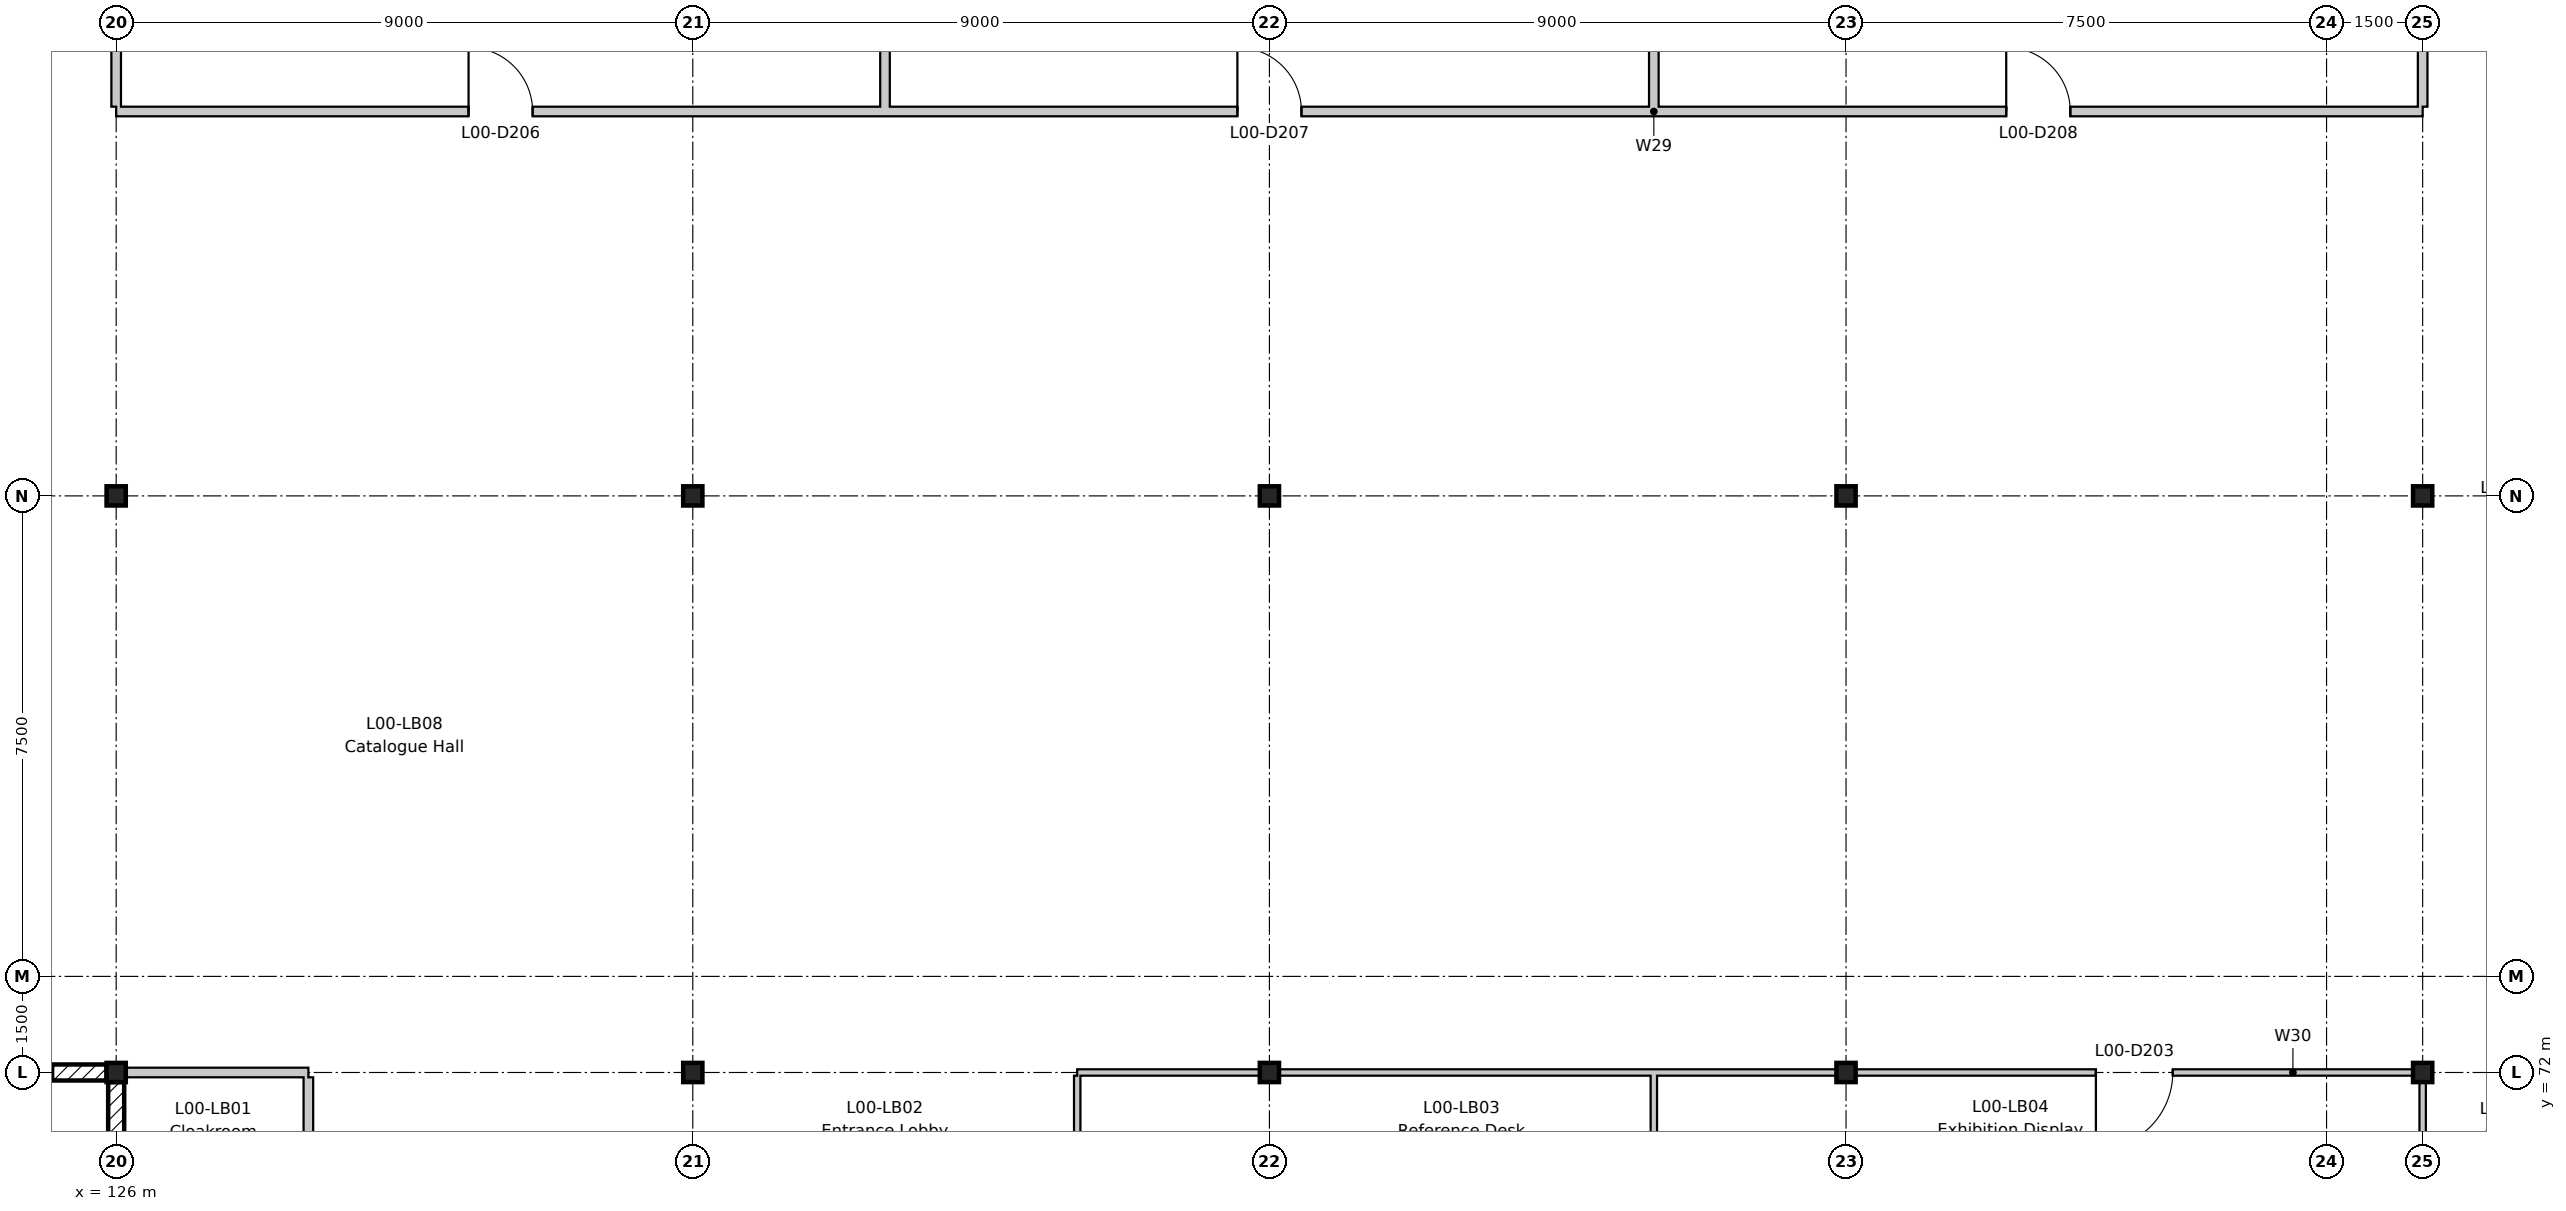
"""IFC4 building model, lengths in metres.
Left out: names, types, materials, properties, quantities, classifications, styles, units other than length and angle.
Written with IfcOpenShell. Run it as: python <this file> out.ifc"""

import sys

from ifc_helpers import new_model, si_unit, direction, frame, frame_2d, origin, origin_2d, place, context, subcontext, project, spatial, rectangle, i_section, extrude, element, fill, save


model = new_model("IFC4")
c1 = context("Model", 3, precision=1e-05, world=origin(), true_north=direction((0.0, 1.0)))
c2 = subcontext(c1, "Body", "Model", "MODEL_VIEW")
j1 = project(units=[si_unit("LENGTHUNIT", "METRE"), si_unit("PLANEANGLEUNIT", "RADIAN")], contexts=[c1])
p1 = place(None, origin())
s1 = spatial("IfcSite", under=j1, at=p1, CompositionType="ELEMENT")
p2 = place(p1, origin())
s2 = spatial("IfcBuilding", under=s1, at=p2, CompositionType="ELEMENT")
p3 = place(p2, origin())
s3 = spatial("IfcBuildingStorey", under=s2, at=p3, CompositionType="ELEMENT", Elevation=0.0)
for number, where, z_axis, x_axis in (
    (1, (126.0, 72.0, -0.6), (0.0, 0.0, 1.0), (1.0, 0.0, 0.0)),
    (2, (126.0, 81.0, -0.6), (0.0, 0.0, 1.0), (1.0, 0.0, 0.0)),
    (3, (135.0, 72.0, -0.6), (0.0, 0.0, 1.0), (1.0, 0.0, 0.0)),
    (4, (135.0, 81.0, -0.6), (0.0, 0.0, 1.0), (1.0, 0.0, 0.0)),
    (5, (144.0, 72.0, -0.6), (0.0, 0.0, 1.0), (1.0, 0.0, 0.0)),
    (6, (144.0, 81.0, -0.6), (0.0, 0.0, 1.0), (1.0, 0.0, 0.0)),
    (7, (153.0, 72.0, -0.6), (0.0, 0.0, 1.0), (1.0, 0.0, 0.0)),
    (8, (153.0, 81.0, -0.6), (0.0, 0.0, 1.0), (1.0, 0.0, 0.0)),
    (9, (162.0, 72.0, -0.6), (0.0, 0.0, 1.0), (1.0, 0.0, 0.0)),
    (10, (162.0, 81.0, -0.6), (0.0, 0.0, 1.0), (1.0, 0.0, 0.0)),
):
    element("IfcColumn", number, at=place(p3, frame(where, z_axis=z_axis, x_axis=x_axis)), inside=s3, PredefinedType="COLUMN", context=c2, shape_type="SweptSolid", body=[
        extrude(i_section(OverallWidth=0.3, OverallDepth=0.3, WebThickness=0.011, FlangeThickness=0.019, FilletRadius=0.027, at=origin_2d()), origin(), (0.0, 0.0, 1.0), 5.8),
    ])
p4 = place(p3, frame((126.0, 63.2, 0.0), z_axis=(0.0, 0.0, 1.0), x_axis=(0.0, 1.0, 0.0)))
e11 = element("IfcWall", 11, at=p4, inside=s3, PredefinedType="SHEAR", context=c2, shape_type="SweptSolid", body=[
    extrude(rectangle(XDim=8.65, YDim=0.25, at=frame_2d((4.325, 0.0))), origin(), (0.0, 0.0, 1.0), 5.2),
])
p5 = place(p3, frame((117.2, 72.0, 0.0), z_axis=(0.0, 0.0, 1.0), x_axis=(1.0, 0.0, 0.0)))
e12 = element("IfcWall", 12, at=p5, inside=s3, PredefinedType="SHEAR", context=c2, shape_type="SweptSolid", body=[
    extrude(rectangle(XDim=8.65, YDim=0.25, at=frame_2d((4.325, 0.0))), origin(), (0.0, 0.0, 1.0), 5.2),
])
p6 = place(p5, frame((6.6, 0.0, 0.0)))
e13 = element("IfcOpeningElement", 13, at=p6, cuts=e12, PredefinedType="OPENING", context=c2, shape_type="SweptSolid", body=[
    extrude(rectangle(XDim=1.2, YDim=2.1, at=frame_2d((0.6, 1.05))), frame((0.0, 0.135, 0.0), z_axis=(0.0, -1.0, 0.0), x_axis=(1.0, 0.0, 0.0)), (0.0, 0.0, 1.0), 0.27),
])
p7 = place(p3, frame((126.15, 72.0, 0.0), z_axis=(0.0, 0.0, 1.0), x_axis=(1.0, 0.0, 0.0)))
e14 = element("IfcWall", 14, at=p7, inside=s3, PredefinedType="PARTITIONING", context=c2, shape_type="SweptSolid", body=[
    extrude(rectangle(XDim=2.85, YDim=0.15, at=frame_2d((1.425, 0.0))), origin(), (0.0, 0.0, 1.0), 4.68),
])
p8 = place(p3, frame((141.0, 72.0, 0.0), z_axis=(0.0, 0.0, 1.0), x_axis=(1.0, 0.0, 0.0)))
e15 = element("IfcWall", 15, at=p8, inside=s3, PredefinedType="PARTITIONING", context=c2, shape_type="SweptSolid", body=[
    extrude(rectangle(XDim=2.85, YDim=0.1, at=frame_2d((1.425, 0.0))), origin(), (0.0, 0.0, 1.0), 4.68),
])
p9 = place(p3, frame((144.15, 72.0, 0.0), z_axis=(0.0, 0.0, 1.0), x_axis=(1.0, 0.0, 0.0)))
e16 = element("IfcWall", 16, at=p9, inside=s3, PredefinedType="PARTITIONING", context=c2, shape_type="SweptSolid", body=[
    extrude(rectangle(XDim=8.7, YDim=0.1, at=frame_2d((4.35, 0.0))), origin(), (0.0, 0.0, 1.0), 4.68),
])
p10 = place(p3, frame((153.15, 72.0, 0.0), z_axis=(0.0, 0.0, 1.0), x_axis=(1.0, 0.0, 0.0)))
e17 = element("IfcWall", 17, at=p10, inside=s3, PredefinedType="PARTITIONING", context=c2, shape_type="SweptSolid", body=[
    extrude(rectangle(XDim=8.7, YDim=0.1, at=frame_2d((4.35, 0.0))), origin(), (0.0, 0.0, 1.0), 4.68),
])
p11 = place(p10, frame((3.75, 0.0, 0.0)))
e18 = element("IfcOpeningElement", 18, at=p11, cuts=e17, PredefinedType="OPENING", context=c2, shape_type="SweptSolid", body=[
    extrude(rectangle(XDim=1.2, YDim=2.1, at=frame_2d((0.6, 1.05))), frame((0.0, 0.06, 0.0), z_axis=(0.0, -1.0, 0.0), x_axis=(1.0, 0.0, 0.0)), (0.0, 0.0, 1.0), 0.12),
])
p12 = place(p3, frame((126.0, 87.0, 0.0), z_axis=(0.0, 0.0, 1.0), x_axis=(1.0, 0.0, 0.0)))
e19 = element("IfcWall", 19, at=p12, inside=s3, PredefinedType="PARTITIONING", context=c2, shape_type="SweptSolid", body=[
    extrude(rectangle(XDim=36.0, YDim=0.15, at=frame_2d((18.0, 0.0))), origin(), (0.0, 0.0, 1.0), 4.68),
])
p13 = place(p12, frame((5.5, 0.0, 0.0)))
e20 = element("IfcOpeningElement", 20, at=p13, cuts=e19, PredefinedType="OPENING", context=c2, shape_type="SweptSolid", body=[
    extrude(rectangle(XDim=1.0, YDim=2.1, at=frame_2d((0.5, 1.05))), frame((0.0, 0.085, 0.0), z_axis=(0.0, -1.0, 0.0), x_axis=(1.0, 0.0, 0.0)), (0.0, 0.0, 1.0), 0.17),
])
p14 = place(p12, frame((17.5, 0.0, 0.0)))
e21 = element("IfcOpeningElement", 21, at=p14, cuts=e19, PredefinedType="OPENING", context=c2, shape_type="SweptSolid", body=[
    extrude(rectangle(XDim=1.0, YDim=2.1, at=frame_2d((0.5, 1.05))), frame((0.0, 0.085, 0.0), z_axis=(0.0, -1.0, 0.0), x_axis=(1.0, 0.0, 0.0)), (0.0, 0.0, 1.0), 0.17),
])
p15 = place(p12, frame((29.5, 0.0, 0.0)))
e22 = element("IfcOpeningElement", 22, at=p15, cuts=e19, PredefinedType="OPENING", context=c2, shape_type="SweptSolid", body=[
    extrude(rectangle(XDim=1.0, YDim=2.1, at=frame_2d((0.5, 1.05))), frame((0.0, 0.085, 0.0), z_axis=(0.0, -1.0, 0.0), x_axis=(1.0, 0.0, 0.0)), (0.0, 0.0, 1.0), 0.17),
])
p16 = place(p3, frame((126.0, 87.075, 0.0), z_axis=(0.0, 0.0, 1.0), x_axis=(0.0, 1.0, 0.0)))
e23 = element("IfcWall", 23, at=p16, inside=s3, PredefinedType="PARTITIONING", context=c2, shape_type="SweptSolid", body=[
    extrude(rectangle(XDim=2.775, YDim=0.15, at=frame_2d((1.388, 0.0))), origin(), (0.0, 0.0, 1.0), 4.68),
])
p17 = place(p3, frame((129.0, 63.2, 0.0), z_axis=(0.0, 0.0, 1.0), x_axis=(0.0, 1.0, 0.0)))
e24 = element("IfcWall", 24, at=p17, inside=s3, PredefinedType="PARTITIONING", context=c2, shape_type="SweptSolid", body=[
    extrude(rectangle(XDim=8.725, YDim=0.15, at=frame_2d((4.363, 0.0))), origin(), (0.0, 0.0, 1.0), 4.68),
])
p18 = place(p17, frame((3.8, 0.0, 0.0)))
e25 = element("IfcOpeningElement", 25, at=p18, cuts=e24, PredefinedType="OPENING", context=c2, shape_type="SweptSolid", body=[
    extrude(rectangle(XDim=1.0, YDim=2.1, at=frame_2d((0.5, 1.05))), frame((0.0, 0.085, 0.0), z_axis=(0.0, -1.0, 0.0), x_axis=(1.0, 0.0, 0.0)), (0.0, 0.0, 1.0), 0.17),
])
p19 = place(p3, frame((138.0, 87.075, 0.0), z_axis=(0.0, 0.0, 1.0), x_axis=(0.0, 1.0, 0.0)))
e26 = element("IfcWall", 26, at=p19, inside=s3, PredefinedType="PARTITIONING", context=c2, shape_type="SweptSolid", body=[
    extrude(rectangle(XDim=2.85, YDim=0.15, at=frame_2d((1.425, 0.0))), origin(), (0.0, 0.0, 1.0), 4.68),
])
p20 = place(p3, frame((141.0, 63.2, 0.0), z_axis=(0.0, 0.0, 1.0), x_axis=(0.0, 1.0, 0.0)))
e27 = element("IfcWall", 27, at=p20, inside=s3, PredefinedType="PARTITIONING", context=c2, shape_type="SweptSolid", body=[
    extrude(rectangle(XDim=8.75, YDim=0.1, at=frame_2d((4.375, 0.0))), origin(), (0.0, 0.0, 1.0), 4.68),
])
p21 = place(p20, frame((3.7, 0.0, 0.0)))
e28 = element("IfcOpeningElement", 28, at=p21, cuts=e27, PredefinedType="OPENING", context=c2, shape_type="SweptSolid", body=[
    extrude(rectangle(XDim=1.2, YDim=2.1, at=frame_2d((0.6, 1.05))), frame((0.0, 0.06, 0.0), z_axis=(0.0, -1.0, 0.0), x_axis=(1.0, 0.0, 0.0)), (0.0, 0.0, 1.0), 0.12),
])
p22 = place(p3, frame((150.0, 87.075, 0.0), z_axis=(0.0, 0.0, 1.0), x_axis=(0.0, 1.0, 0.0)))
e29 = element("IfcWall", 29, at=p22, inside=s3, PredefinedType="PARTITIONING", context=c2, shape_type="SweptSolid", body=[
    extrude(rectangle(XDim=2.85, YDim=0.15, at=frame_2d((1.425, 0.0))), origin(), (0.0, 0.0, 1.0), 4.68),
])
p23 = place(p3, frame((150.0, 63.2, 0.0), z_axis=(0.0, 0.0, 1.0), x_axis=(0.0, 1.0, 0.0)))
e30 = element("IfcWall", 30, at=p23, inside=s3, PredefinedType="PARTITIONING", context=c2, shape_type="SweptSolid", body=[
    extrude(rectangle(XDim=8.75, YDim=0.1, at=frame_2d((4.375, 0.0))), origin(), (0.0, 0.0, 1.0), 4.68),
])
p24 = place(p3, frame((162.0, 87.075, 0.0), z_axis=(0.0, 0.0, 1.0), x_axis=(0.0, 1.0, 0.0)))
e31 = element("IfcWall", 31, at=p24, inside=s3, PredefinedType="PARTITIONING", context=c2, shape_type="SweptSolid", body=[
    extrude(rectangle(XDim=2.775, YDim=0.15, at=frame_2d((1.388, 0.0))), origin(), (0.0, 0.0, 1.0), 4.68),
])
p25 = place(p3, frame((162.0, 63.2, 0.0), z_axis=(0.0, 0.0, 1.0), x_axis=(0.0, 1.0, 0.0)))
e32 = element("IfcWall", 32, at=p25, inside=s3, PredefinedType="PARTITIONING", context=c2, shape_type="SweptSolid", body=[
    extrude(rectangle(XDim=8.65, YDim=0.1, at=frame_2d((4.325, 0.0))), origin(), (0.0, 0.0, 1.0), 4.68),
])
p26 = place(p11, frame((1.2, 0.0, 0.0), z_axis=(0.0, 0.0, 1.0), x_axis=(-1.0, 0.0, 0.0)))
e33 = element("IfcDoor", 33, at=p26, inside=s3, OperationType="SINGLE_SWING_RIGHT", PredefinedType="DOOR", context=c2, shape_type="SweptSolid", body=[
    extrude(rectangle(XDim=1.2, YDim=2.1, at=frame_2d((0.6, 1.05))), frame((0.0, 0.025, 0.0), z_axis=(0.0, -1.0, 0.0), x_axis=(1.0, 0.0, 0.0)), (0.0, 0.0, 1.0), 0.05),
])
fill(e18, e33)
p27 = place(p13, origin())
e34 = element("IfcDoor", 34, at=p27, inside=s3, OperationType="SINGLE_SWING_LEFT", PredefinedType="DOOR", context=c2, shape_type="SweptSolid", body=[
    extrude(rectangle(XDim=1.0, YDim=2.1, at=frame_2d((0.5, 1.05))), frame((0.0, 0.025, 0.0), z_axis=(0.0, -1.0, 0.0), x_axis=(1.0, 0.0, 0.0)), (0.0, 0.0, 1.0), 0.05),
])
fill(e20, e34)
p28 = place(p14, origin())
e35 = element("IfcDoor", 35, at=p28, inside=s3, OperationType="SINGLE_SWING_LEFT", PredefinedType="DOOR", context=c2, shape_type="SweptSolid", body=[
    extrude(rectangle(XDim=1.0, YDim=2.1, at=frame_2d((0.5, 1.05))), frame((0.0, 0.025, 0.0), z_axis=(0.0, -1.0, 0.0), x_axis=(1.0, 0.0, 0.0)), (0.0, 0.0, 1.0), 0.05),
])
fill(e21, e35)
p29 = place(p15, origin())
e36 = element("IfcDoor", 36, at=p29, inside=s3, OperationType="SINGLE_SWING_LEFT", PredefinedType="DOOR", context=c2, shape_type="SweptSolid", body=[
    extrude(rectangle(XDim=1.0, YDim=2.1, at=frame_2d((0.5, 1.05))), frame((0.0, 0.025, 0.0), z_axis=(0.0, -1.0, 0.0), x_axis=(1.0, 0.0, 0.0)), (0.0, 0.0, 1.0), 0.05),
])
fill(e22, e36)
p30 = place(p6, origin())
e37 = element("IfcDoor", 37, at=p30, inside=s3, OperationType="SINGLE_SWING_LEFT", PredefinedType="DOOR", context=c2, shape_type="SweptSolid", body=[
    extrude(rectangle(XDim=1.2, YDim=2.1, at=frame_2d((0.6, 1.05))), frame((0.0, 0.025, 0.0), z_axis=(0.0, -1.0, 0.0), x_axis=(1.0, 0.0, 0.0)), (0.0, 0.0, 1.0), 0.05),
])
fill(e13, e37)
save(model, sys.argv[1])
